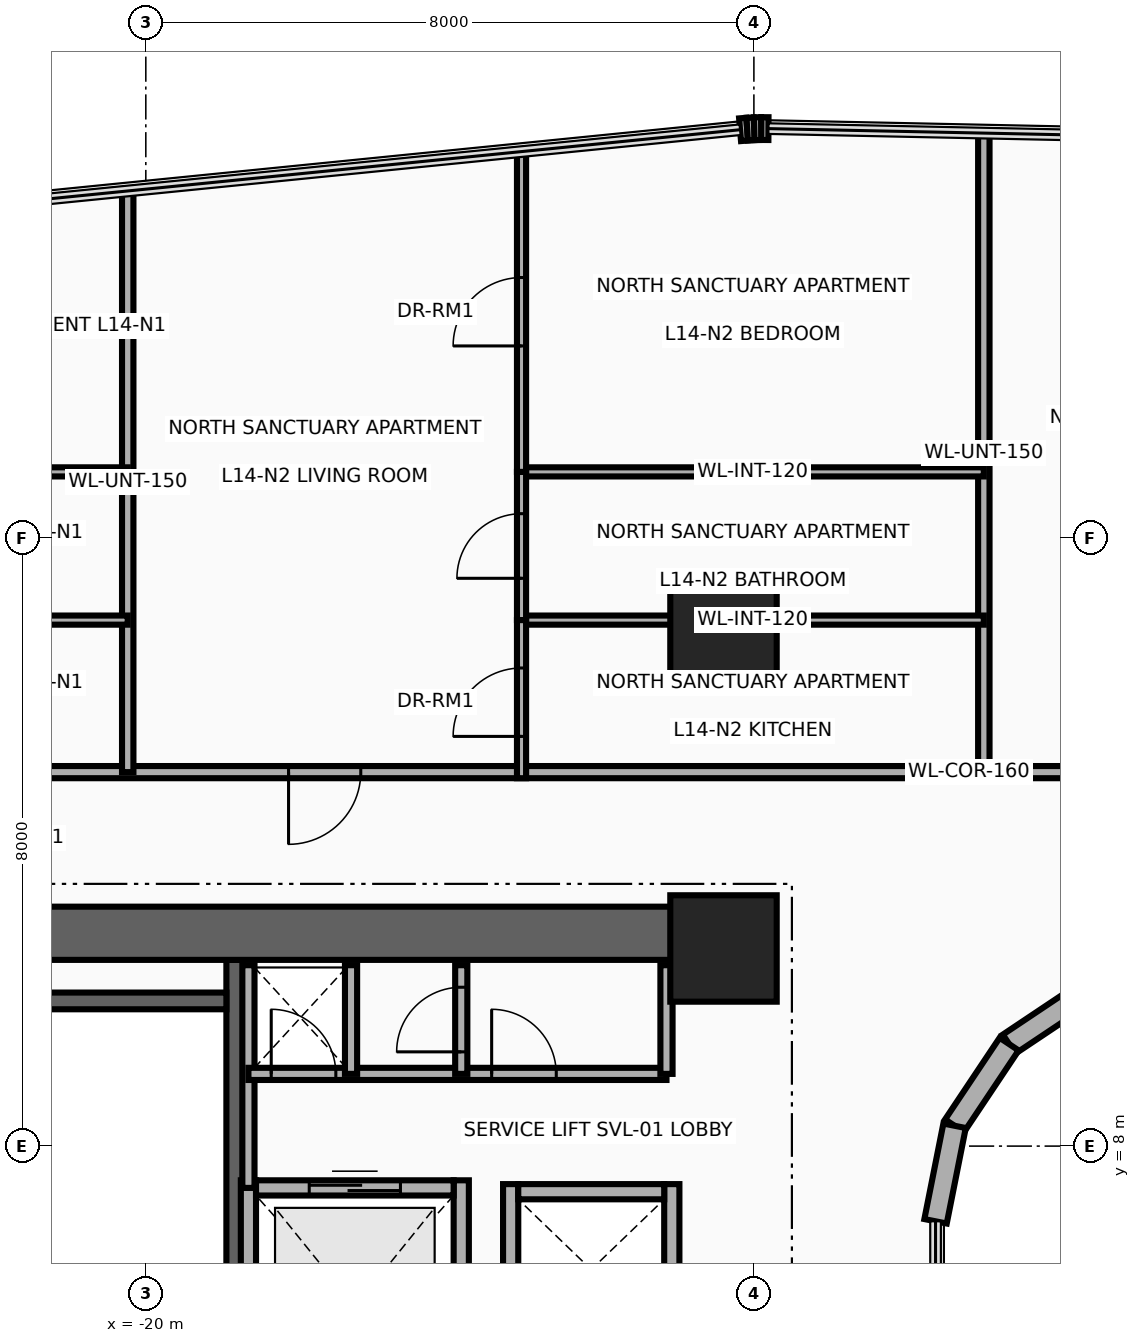
"""IFC4 building model, lengths in metres.
Left out: names, types, materials, properties, quantities, classifications, styles, units other than length and angle.
Written with IfcOpenShell. Run it as: python <this file> out.ifc"""

import sys

from ifc_helpers import new_model, si_unit, direction, frame, frame_2d, origin, origin_2d, place, context, subcontext, project, spatial, rectangle, extrude, source, transform, mapped, element, fill, save


model = new_model("IFC4")
c1 = context("Model", 3, precision=1e-05, world=origin(), true_north=direction((0.0, 1.0)))
c2 = subcontext(c1, "Body", "Model", "MODEL_VIEW")
j1 = project(units=[si_unit("LENGTHUNIT", "METRE"), si_unit("PLANEANGLEUNIT", "RADIAN")], contexts=[c1])
p1 = place(None, origin())
s1 = spatial("IfcSite", under=j1, at=p1, CompositionType="ELEMENT")
p2 = place(p1, origin())
s2 = spatial("IfcBuilding", under=s1, at=p2, CompositionType="ELEMENT")
p3 = place(p2, frame((0.0, 0.0, 59.3)))
s3 = spatial("IfcBuildingStorey", under=s2, at=p3, CompositionType="ELEMENT", Elevation=59.3)
p4 = place(p3, frame((-18.83, 1.78, 0.0), z_axis=(0.0, 0.0, 1.0), x_axis=(0.0, 1.0, 0.0)))
e1 = element("IfcWall", 1, at=p4, inside=s3, PredefinedType="SHEAR", context=c2, shape_type="SweptSolid", body=[
    extrude(rectangle(XDim=8.67, YDim=0.22, at=frame_2d((4.335, 0.0))), origin(), (0.0, 0.0, 1.0), 3.46),
])
p5 = place(p3, frame((-22.05, 9.91, 0.0), z_axis=(0.0, 0.0, 1.0), x_axis=(1.0, 0.0, 0.0)))
e2 = element("IfcWall", 2, at=p5, inside=s3, PredefinedType="SHEAR", context=c2, shape_type="SweptSolid", body=[
    extrude(rectangle(XDim=3.11, YDim=0.22, at=frame_2d((1.555, 0.0))), origin(), (0.0, 0.0, 1.0), 3.46),
])
p6 = place(p3, frame((-22.65, 10.8, 0.0), z_axis=(0.0, 0.0, 1.0), x_axis=(1.0, 0.0, 0.0)))
e3 = element("IfcWall", 3, at=p6, inside=s3, PredefinedType="SHEAR", context=c2, shape_type="SweptSolid", body=[
    extrude(rectangle(XDim=10.25, YDim=0.7, at=frame_2d((5.125, 0.0))), origin(), (0.0, 0.0, 1.0), 3.46),
])
m1 = source(origin(), c2, "Body", "SweptSolid", [
    extrude(rectangle(XDim=1.4, YDim=1.4, at=origin_2d()), origin(), (0.0, 0.0, 1.0), 3.7),
])
for number, where, z_axis, x_axis in (
    (4, (-12.4, 10.6, 0.0), (0.0, 0.0, 1.0), (1.0, 0.0, 0.0)),
    (5, (-12.4, 14.8, 0.0), (0.0, 0.0, 1.0), (1.0, 0.0, 0.0)),
):
    element("IfcColumn", number, at=place(p3, frame(where, z_axis=z_axis, x_axis=x_axis)), inside=s3, PredefinedType="COLUMN", context=c2, shape_type="MappedRepresentation", body=[
        mapped(m1, transform((0.0, 0.0, 0.0), x_axis=(1.0, 0.0, 0.0), y_axis=(0.0, 1.0, 0.0), z_axis=(0.0, 0.0, 1.0), scale=1.0)),
    ])
p7 = place(p3, frame((-12.182, 21.371, 0.0), z_axis=(0.0, 0.0, 1.0), x_axis=(0.996527790842, 0.08326080759, 0.0)))
e6 = element("IfcWall", 6, at=p7, inside=s3, PredefinedType="SOLIDWALL", context=c2, shape_type="SweptSolid", body=[
    extrude(rectangle(XDim=0.094, YDim=0.3, at=frame_2d((0.047, 0.0))), origin(), (0.0, 0.0, 1.0), 3.46),
])
p8 = place(p3, frame((-12.088, 21.379, 0.0), z_axis=(0.0, 0.0, 1.0), x_axis=(0.998476480444, 0.055178963393, 0.0)))
e7 = element("IfcWall", 7, at=p8, inside=s3, PredefinedType="SOLIDWALL", context=c2, shape_type="SweptSolid", body=[
    extrude(rectangle(XDim=0.093, YDim=0.3, at=frame_2d((0.046, 0.0))), origin(), (0.0, 0.0, 1.0), 3.46),
])
p9 = place(p3, frame((-11.996, 21.384, 0.0), z_axis=(0.0, 0.0, 1.0), x_axis=(0.999722573757, 0.023553673204, 0.0)))
e8 = element("IfcWall", 8, at=p9, inside=s3, PredefinedType="SOLIDWALL", context=c2, shape_type="SweptSolid", body=[
    extrude(rectangle(XDim=0.093, YDim=0.3, at=frame_2d((0.047, 0.0))), origin(), (0.0, 0.0, 1.0), 3.46),
])
p10 = place(p3, frame((-11.902, 21.386, 0.0), z_axis=(0.0, 0.0, 1.0), x_axis=(0.999986507273, -0.005194735103, 0.0)))
e9 = element("IfcWall", 9, at=p10, inside=s3, PredefinedType="SOLIDWALL", context=c2, shape_type="SweptSolid", body=[
    extrude(rectangle(XDim=0.094, YDim=0.3, at=frame_2d((0.047, 0.0))), origin(), (0.0, 0.0, 1.0), 3.46),
])
p11 = place(p3, frame((-7.567, 10.06, 0.0), z_axis=(0.0, 0.0, 1.0), x_axis=(-0.831497739511, -0.555528135371, 0.0)))
e10 = element("IfcWall", 10, at=p11, inside=s3, PredefinedType="SOLIDWALL", context=c2, shape_type="SweptSolid", body=[
    extrude(rectangle(XDim=1.292, YDim=0.3, at=frame_2d((0.646, 0.0))), origin(), (0.0, 0.0, 1.0), 3.46),
])
p12 = place(p3, frame((-8.642, 9.342, 0.0), z_axis=(0.0, 0.0, 1.0), x_axis=(-0.555615398575, -0.831439431869, 0.0)))
e11 = element("IfcWall", 11, at=p12, inside=s3, PredefinedType="SOLIDWALL", context=c2, shape_type="SweptSolid", body=[
    extrude(rectangle(XDim=1.292, YDim=0.3, at=frame_2d((0.646, 0.0))), origin(), (0.0, 0.0, 1.0), 3.46),
])
p13 = place(p3, frame((-9.36, 8.268, 0.0), z_axis=(0.0, 0.0, 1.0), x_axis=(-0.195090163074, -0.980785312019, 0.0)))
e12 = element("IfcWall", 12, at=p13, inside=s3, PredefinedType="SOLIDWALL", context=c2, shape_type="SweptSolid", body=[
    extrude(rectangle(XDim=1.281, YDim=0.3, at=frame_2d((0.641, 0.0))), origin(), (0.0, 0.0, 1.0), 3.46),
])
for number, where, z_axis, x_axis in (
    (13, (-18.65, 4.225, 0.0), (0.0, 0.0, 1.0), (0.0, 1.0, 0.0)),
    (14, (-15.85, 4.225, 0.0), (0.0, 0.0, 1.0), (0.0, 1.0, 0.0)),
):
    element("IfcWall", number, at=place(p3, frame(where, z_axis=z_axis, x_axis=x_axis)), inside=s3, PredefinedType="MOVABLE", context=c2, shape_type="SweptSolid", body=[
        extrude(rectangle(XDim=3.325, YDim=0.2, at=frame_2d((1.663, 0.0))), origin(), (0.0, 0.0, 1.0), 3.46),
    ])
p14 = place(p3, frame((-18.55, 7.45, 0.0), z_axis=(0.0, 0.0, 1.0), x_axis=(1.0, 0.0, 0.0)))
e15 = element("IfcWall", 15, at=p14, inside=s3, PredefinedType="MOVABLE", context=c2, shape_type="SweptSolid", body=[
    extrude(rectangle(XDim=2.6, YDim=0.2, at=frame_2d((1.3, 0.0))), origin(), (0.0, 0.0, 1.0), 3.46),
])
p15 = place(p14, frame((0.7, 0.0, 0.0)))
e16 = element("IfcOpeningElement", 16, at=p15, cuts=e15, PredefinedType="OPENING", context=c2, shape_type="SweptSolid", body=[
    extrude(rectangle(XDim=1.2, YDim=2.1, at=frame_2d((0.6, 1.05))), frame((0.0, 0.115, 0.0), z_axis=(0.0, -1.0, 0.0), x_axis=(1.0, 0.0, 0.0)), (0.0, 0.0, 1.0), 0.23),
])
for number, where, z_axis, x_axis in (
    (17, (-15.2, 5.25, 0.0), (0.0, 0.0, 1.0), (0.0, 1.0, 0.0)),
    (18, (-13.08, 5.25, 0.0), (0.0, 0.0, 1.0), (0.0, 1.0, 0.0)),
):
    element("IfcWall", number, at=place(p3, frame(where, z_axis=z_axis, x_axis=x_axis)), inside=s3, PredefinedType="MOVABLE", context=c2, shape_type="SweptSolid", body=[
        extrude(rectangle(XDim=2.25, YDim=0.2, at=frame_2d((1.125, 0.0))), origin(), (0.0, 0.0, 1.0), 3.46),
    ])
p16 = place(p3, frame((-15.1, 7.4, 0.0), z_axis=(0.0, 0.0, 1.0), x_axis=(1.0, 0.0, 0.0)))
e19 = element("IfcWall", 19, at=p16, inside=s3, PredefinedType="MOVABLE", context=c2, shape_type="SweptSolid", body=[
    extrude(rectangle(XDim=1.92, YDim=0.2, at=frame_2d((0.96, 0.0))), origin(), (0.0, 0.0, 1.0), 3.46),
])
p17 = place(p3, frame((-18.65, 7.45, 0.0), z_axis=(0.0, 0.0, 1.0), x_axis=(0.0, 1.0, 0.0)))
e20 = element("IfcWall", 20, at=p17, inside=s3, PredefinedType="PARTITIONING", context=c2, shape_type="SweptSolid", body=[
    extrude(rectangle(XDim=2.93, YDim=0.16, at=frame_2d((1.465, 0.0))), origin(), (0.0, 0.0, 1.0), 3.46),
])
p18 = place(p3, frame((-18.65, 8.95, 0.0), z_axis=(0.0, 0.0, 1.0), x_axis=(1.0, 0.0, 0.0)))
e21 = element("IfcWall", 21, at=p18, inside=s3, PredefinedType="PARTITIONING", context=c2, shape_type="SweptSolid", body=[
    extrude(rectangle(XDim=5.5, YDim=0.16, at=frame_2d((2.75, 0.0))), origin(), (0.0, 0.0, 1.0), 3.46),
])
p19 = place(p18, frame((0.3, 0.0, 0.0)))
e22 = element("IfcOpeningElement", 22, at=p19, cuts=e21, PredefinedType="OPENING", context=c2, shape_type="SweptSolid", body=[
    extrude(rectangle(XDim=0.85, YDim=2.05, at=frame_2d((0.425, 1.025))), frame((0.0, 0.095, 0.0), z_axis=(0.0, -1.0, 0.0), x_axis=(1.0, 0.0, 0.0)), (0.0, 0.0, 1.0), 0.19),
])
p20 = place(p18, frame((3.2, 0.0, 0.0)))
e23 = element("IfcOpeningElement", 23, at=p20, cuts=e21, PredefinedType="OPENING", context=c2, shape_type="SweptSolid", body=[
    extrude(rectangle(XDim=0.85, YDim=2.05, at=frame_2d((0.425, 1.025))), frame((0.0, 0.095, 0.0), z_axis=(0.0, -1.0, 0.0), x_axis=(1.0, 0.0, 0.0)), (0.0, 0.0, 1.0), 0.19),
])
for number, where, z_axis, x_axis in (
    (24, (-13.15, 8.95, 0.0), (0.0, 0.0, 1.0), (0.0, 1.0, 0.0)),
    (25, (-17.3, 8.95, 0.0), (0.0, 0.0, 1.0), (0.0, 1.0, 0.0)),
):
    element("IfcWall", number, at=place(p3, frame(where, z_axis=z_axis, x_axis=x_axis)), inside=s3, PredefinedType="PARTITIONING", context=c2, shape_type="SweptSolid", body=[
        extrude(rectangle(XDim=1.43, YDim=0.16, at=frame_2d((0.715, 0.0))), origin(), (0.0, 0.0, 1.0), 3.46),
    ])
p21 = place(p3, frame((-15.85, 8.95, 0.0), z_axis=(0.0, 0.0, 1.0), x_axis=(0.0, 1.0, 0.0)))
e26 = element("IfcWall", 26, at=p21, inside=s3, PredefinedType="PARTITIONING", context=c2, shape_type="SweptSolid", body=[
    extrude(rectangle(XDim=1.43, YDim=0.16, at=frame_2d((0.715, 0.0))), origin(), (0.0, 0.0, 1.0), 3.46),
])
p22 = place(p21, frame((0.29, 0.0, 0.0)))
e27 = element("IfcOpeningElement", 27, at=p22, cuts=e26, PredefinedType="OPENING", context=c2, shape_type="SweptSolid", body=[
    extrude(rectangle(XDim=0.85, YDim=2.05, at=frame_2d((0.425, 1.025))), frame((0.0, 0.095, 0.0), z_axis=(0.0, -1.0, 0.0), x_axis=(1.0, 0.0, 0.0)), (0.0, 0.0, 1.0), 0.19),
])
p23 = place(p3, frame((-31.89, 12.92, 0.0), z_axis=(0.0, 0.0, 1.0), x_axis=(1.0, 0.0, 0.0)))
e28 = element("IfcWall", 28, at=p23, inside=s3, PredefinedType="PARTITIONING", context=c2, shape_type="SweptSolid", body=[
    extrude(rectangle(XDim=45.44, YDim=0.16, at=frame_2d((22.72, 0.0))), origin(), (0.0, 0.0, 1.0), 2.583),
])
p24 = place(p23, frame((2.88, 0.0, 0.0)))
e29 = element("IfcOpeningElement", 29, at=p24, cuts=e28, PredefinedType="OPENING", context=c2, shape_type="SweptSolid", body=[
    extrude(rectangle(XDim=0.95, YDim=2.15, at=frame_2d((0.475, 1.075))), frame((0.0, 0.095, 0.0), z_axis=(0.0, -1.0, 0.0), x_axis=(1.0, 0.0, 0.0)), (0.0, 0.0, 1.0), 0.19),
])
p25 = place(p23, frame((13.768, 0.0, 0.0)))
e30 = element("IfcOpeningElement", 30, at=p25, cuts=e28, PredefinedType="OPENING", context=c2, shape_type="SweptSolid", body=[
    extrude(rectangle(XDim=0.95, YDim=2.15, at=frame_2d((0.475, 1.075))), frame((0.0, 0.095, 0.0), z_axis=(0.0, -1.0, 0.0), x_axis=(1.0, 0.0, 0.0)), (0.0, 0.0, 1.0), 0.19),
])
p26 = place(p23, frame((25.855, 0.0, 0.0)))
e31 = element("IfcOpeningElement", 31, at=p26, cuts=e28, PredefinedType="OPENING", context=c2, shape_type="SweptSolid", body=[
    extrude(rectangle(XDim=0.95, YDim=2.15, at=frame_2d((0.475, 1.075))), frame((0.0, 0.095, 0.0), z_axis=(0.0, -1.0, 0.0), x_axis=(1.0, 0.0, 0.0)), (0.0, 0.0, 1.0), 0.19),
])
p27 = place(p23, frame((36.292, 0.0, 0.0)))
e32 = element("IfcOpeningElement", 32, at=p27, cuts=e28, PredefinedType="OPENING", context=c2, shape_type="SweptSolid", body=[
    extrude(rectangle(XDim=0.95, YDim=2.15, at=frame_2d((0.475, 1.075))), frame((0.0, 0.095, 0.0), z_axis=(0.0, -1.0, 0.0), x_axis=(1.0, 0.0, 0.0)), (0.0, 0.0, 1.0), 0.19),
])
p28 = place(p3, frame((-20.238, 12.92, 0.0), z_axis=(0.0, 0.0, 1.0), x_axis=(0.0, 1.0, 0.0)))
e33 = element("IfcWall", 33, at=p28, inside=s3, PredefinedType="PARTITIONING", context=c2, shape_type="SweptSolid", body=[
    extrude(rectangle(XDim=7.646, YDim=0.15, at=frame_2d((3.823, 0.0))), origin(), (0.0, 0.0, 1.0), 2.583),
])
p29 = place(p3, frame((-8.975, 12.92, 0.0), z_axis=(0.0, 0.0, 1.0), x_axis=(0.0, 1.0, 0.0)))
e34 = element("IfcWall", 34, at=p29, inside=s3, PredefinedType="PARTITIONING", context=c2, shape_type="SweptSolid", body=[
    extrude(rectangle(XDim=8.407, YDim=0.15, at=frame_2d((4.204, 0.0))), origin(), (0.0, 0.0, 1.0), 2.583),
])
p30 = place(p3, frame((-26.53, 14.92, 0.0), z_axis=(0.0, 0.0, 1.0), x_axis=(1.0, 0.0, 0.0)))
e35 = element("IfcWall", 35, at=p30, inside=s3, PredefinedType="PARTITIONING", context=c2, shape_type="SweptSolid", body=[
    extrude(rectangle(XDim=6.292, YDim=0.12, at=frame_2d((3.146, 0.0))), origin(), (0.0, 0.0, 1.0), 2.583),
])
p31 = place(p3, frame((-26.53, 16.87, 0.0), z_axis=(0.0, 0.0, 1.0), x_axis=(1.0, 0.0, 0.0)))
e36 = element("IfcWall", 36, at=p31, inside=s3, PredefinedType="PARTITIONING", context=c2, shape_type="SweptSolid", body=[
    extrude(rectangle(XDim=6.292, YDim=0.12, at=frame_2d((3.146, 0.0))), origin(), (0.0, 0.0, 1.0), 3.46),
])
p32 = place(p3, frame((-15.057, 14.92, 0.0), z_axis=(0.0, 0.0, 1.0), x_axis=(1.0, 0.0, 0.0)))
e37 = element("IfcWall", 37, at=p32, inside=s3, PredefinedType="PARTITIONING", context=c2, shape_type="SweptSolid", body=[
    extrude(rectangle(XDim=6.082, YDim=0.12, at=frame_2d((3.041, 0.0))), origin(), (0.0, 0.0, 1.0), 2.583),
])
p33 = place(p3, frame((-15.057, 16.87, 0.0), z_axis=(0.0, 0.0, 1.0), x_axis=(1.0, 0.0, 0.0)))
e38 = element("IfcWall", 38, at=p33, inside=s3, PredefinedType="PARTITIONING", context=c2, shape_type="SweptSolid", body=[
    extrude(rectangle(XDim=6.082, YDim=0.12, at=frame_2d((3.041, 0.0))), origin(), (0.0, 0.0, 1.0), 3.46),
])
p34 = place(p3, frame((-15.057, 14.92, 0.0), z_axis=(0.0, 0.0, 1.0), x_axis=(0.0, 1.0, 0.0)))
e39 = element("IfcWall", 39, at=p34, inside=s3, PredefinedType="PARTITIONING", context=c2, shape_type="SweptSolid", body=[
    extrude(rectangle(XDim=1.95, YDim=0.12, at=frame_2d((0.975, 0.0))), origin(), (0.0, 0.0, 1.0), 2.583),
])
p35 = place(p34, frame((0.55, 0.0, 0.0)))
e40 = element("IfcOpeningElement", 40, at=p35, cuts=e39, PredefinedType="OPENING", context=c2, shape_type="SweptSolid", body=[
    extrude(rectangle(XDim=0.85, YDim=2.1, at=frame_2d((0.425, 1.05))), frame((0.0, 0.075, 0.0), z_axis=(0.0, -1.0, 0.0), x_axis=(1.0, 0.0, 0.0)), (0.0, 0.0, 1.0), 0.15),
])
p36 = place(p3, frame((-15.057, 12.84, 0.0), z_axis=(0.0, 0.0, 1.0), x_axis=(0.0, 1.0, 0.0)))
e41 = element("IfcWall", 41, at=p36, inside=s3, PredefinedType="PARTITIONING", context=c2, shape_type="SweptSolid", body=[
    extrude(rectangle(XDim=2.08, YDim=0.12, at=frame_2d((1.04, 0.0))), origin(), (0.0, 0.0, 1.0), 2.583),
])
p37 = place(p36, frame((0.55, 0.0, 0.0)))
e42 = element("IfcOpeningElement", 42, at=p37, cuts=e41, PredefinedType="OPENING", context=c2, shape_type="SweptSolid", body=[
    extrude(rectangle(XDim=0.9, YDim=2.1, at=frame_2d((0.45, 1.05))), frame((0.0, 0.075, 0.0), z_axis=(0.0, -1.0, 0.0), x_axis=(1.0, 0.0, 0.0)), (0.0, 0.0, 1.0), 0.15),
])
p38 = place(p3, frame((-15.057, 16.87, 0.0), z_axis=(0.0, 0.0, 1.0), x_axis=(0.0, 1.0, 0.0)))
e43 = element("IfcWall", 43, at=p38, inside=s3, PredefinedType="PARTITIONING", context=c2, shape_type="SweptSolid", body=[
    extrude(rectangle(XDim=4.214, YDim=0.12, at=frame_2d((2.107, 0.0))), origin(), (0.0, 0.0, 1.0), 3.46),
])
p39 = place(p38, frame((1.657, 0.0, 0.0)))
e44 = element("IfcOpeningElement", 44, at=p39, cuts=e43, PredefinedType="OPENING", context=c2, shape_type="SweptSolid", body=[
    extrude(rectangle(XDim=0.9, YDim=2.1, at=frame_2d((0.45, 1.05))), frame((0.0, 0.075, 0.0), z_axis=(0.0, -1.0, 0.0), x_axis=(1.0, 0.0, 0.0)), (0.0, 0.0, 1.0), 0.15),
])
p40 = place(p15, origin())
e45 = element("IfcDoor", 45, at=p40, inside=s3, OperationType="DOUBLE_DOOR_SLIDING", PredefinedType="DOOR", context=c2, shape_type="SweptSolid", body=[
    extrude(rectangle(XDim=1.2, YDim=2.1, at=frame_2d((0.6, 1.05))), frame((0.0, 0.025, 0.0), z_axis=(0.0, -1.0, 0.0), x_axis=(1.0, 0.0, 0.0)), (0.0, 0.0, 1.0), 0.05),
])
fill(e16, e45)
p41 = place(p19, origin())
e46 = element("IfcDoor", 46, at=p41, inside=s3, OperationType="SINGLE_SWING_LEFT", PredefinedType="DOOR", context=c2, shape_type="SweptSolid", body=[
    extrude(rectangle(XDim=0.85, YDim=2.05, at=frame_2d((0.425, 1.025))), frame((0.0, 0.025, 0.0), z_axis=(0.0, -1.0, 0.0), x_axis=(1.0, 0.0, 0.0)), (0.0, 0.0, 1.0), 0.05),
])
fill(e22, e46)
p42 = place(p20, origin())
e47 = element("IfcDoor", 47, at=p42, inside=s3, OperationType="SINGLE_SWING_RIGHT", PredefinedType="DOOR", context=c2, shape_type="SweptSolid", body=[
    extrude(rectangle(XDim=0.85, YDim=2.05, at=frame_2d((0.425, 1.025))), frame((0.0, 0.025, 0.0), z_axis=(0.0, -1.0, 0.0), x_axis=(1.0, 0.0, 0.0)), (0.0, 0.0, 1.0), 0.05),
])
fill(e23, e47)
p43 = place(p22, origin())
e48 = element("IfcDoor", 48, at=p43, inside=s3, OperationType="SINGLE_SWING_LEFT", PredefinedType="DOOR", context=c2, shape_type="SweptSolid", body=[
    extrude(rectangle(XDim=0.85, YDim=2.05, at=frame_2d((0.425, 1.025))), frame((0.0, 0.025, 0.0), z_axis=(0.0, -1.0, 0.0), x_axis=(1.0, 0.0, 0.0)), (0.0, 0.0, 1.0), 0.05),
])
fill(e27, e48)
p44 = place(p25, frame((0.95, 0.0, 0.0), z_axis=(0.0, 0.0, 1.0), x_axis=(-1.0, 0.0, 0.0)))
e49 = element("IfcDoor", 49, at=p44, inside=s3, OperationType="SINGLE_SWING_LEFT", PredefinedType="DOOR", context=c2, shape_type="SweptSolid", body=[
    extrude(rectangle(XDim=0.95, YDim=2.15, at=frame_2d((0.475, 1.075))), frame((0.0, 0.025, 0.0), z_axis=(0.0, -1.0, 0.0), x_axis=(1.0, 0.0, 0.0)), (0.0, 0.0, 1.0), 0.05),
])
fill(e30, e49)
p45 = place(p35, origin())
e50 = element("IfcDoor", 50, at=p45, inside=s3, OperationType="SINGLE_SWING_RIGHT", PredefinedType="DOOR", context=c2, shape_type="SweptSolid", body=[
    extrude(rectangle(XDim=0.85, YDim=2.1, at=frame_2d((0.425, 1.05))), frame((0.0, 0.025, 0.0), z_axis=(0.0, -1.0, 0.0), x_axis=(1.0, 0.0, 0.0)), (0.0, 0.0, 1.0), 0.05),
])
fill(e40, e50)
p46 = place(p37, origin())
e51 = element("IfcDoor", 51, at=p46, inside=s3, OperationType="SINGLE_SWING_LEFT", PredefinedType="DOOR", context=c2, shape_type="SweptSolid", body=[
    extrude(rectangle(XDim=0.9, YDim=2.1, at=frame_2d((0.45, 1.05))), frame((0.0, 0.025, 0.0), z_axis=(0.0, -1.0, 0.0), x_axis=(1.0, 0.0, 0.0)), (0.0, 0.0, 1.0), 0.05),
])
fill(e42, e51)
p47 = place(p39, origin())
e52 = element("IfcDoor", 52, at=p47, inside=s3, OperationType="SINGLE_SWING_RIGHT", PredefinedType="DOOR", context=c2, shape_type="SweptSolid", body=[
    extrude(rectangle(XDim=0.9, YDim=2.1, at=frame_2d((0.45, 1.05))), frame((0.0, 0.025, 0.0), z_axis=(0.0, -1.0, 0.0), x_axis=(1.0, 0.0, 0.0)), (0.0, 0.0, 1.0), 0.05),
])
fill(e44, e52)
save(model, sys.argv[1])
